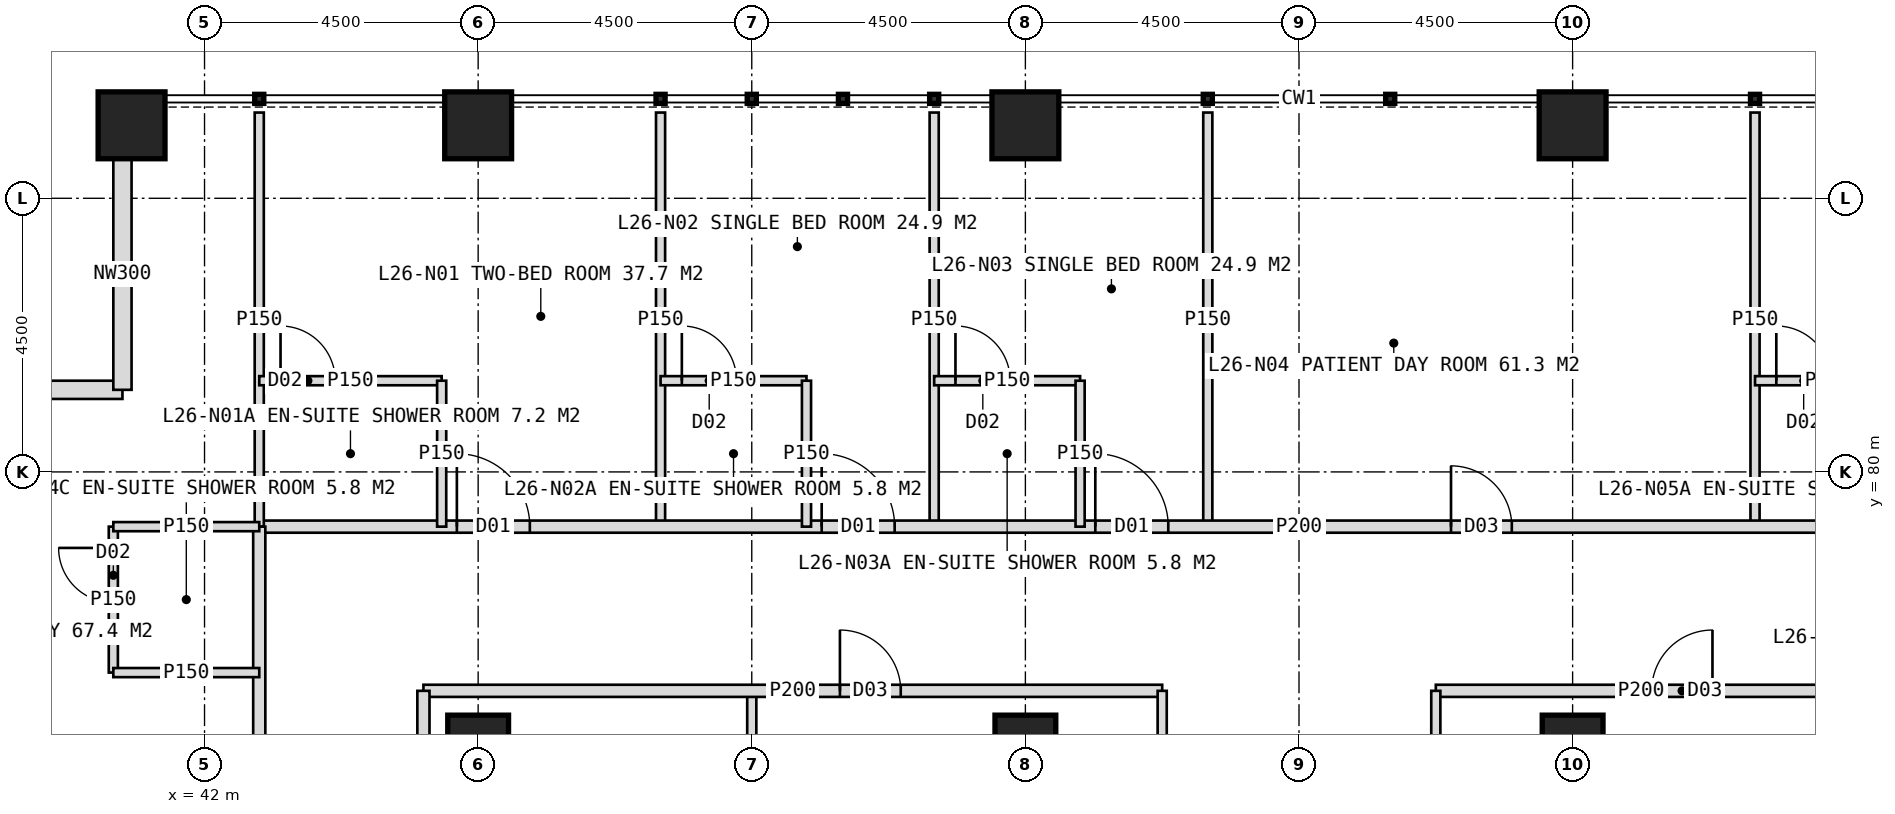
"""IFC4 building model, lengths in metres.
Left out: names, types, materials, properties, quantities, classifications, styles, units other than length and angle.
Written with IfcOpenShell. Run it as: python <this file> out.ifc"""

import sys

from ifc_helpers import new_model, si_unit, direction, frame, frame_2d, origin, origin_2d, place, context, subcontext, project, spatial, rectangle, hollow_rectangle, extrude, element, fill, save


model = new_model("IFC4")
c1 = context("Model", 3, precision=1e-05, world=origin(), true_north=direction((0.0, 1.0)))
c2 = subcontext(c1, "Body", "Model", "MODEL_VIEW")
j1 = project(units=[si_unit("LENGTHUNIT", "METRE"), si_unit("PLANEANGLEUNIT", "RADIAN")], contexts=[c1])
p1 = place(None, origin())
s1 = spatial("IfcSite", under=j1, at=p1, CompositionType="ELEMENT")
p2 = place(p1, origin())
s2 = spatial("IfcBuilding", under=s1, at=p2, CompositionType="ELEMENT")
p3 = place(p2, frame((0.0, 0.0, 112.0)))
s3 = spatial("IfcBuildingStorey", under=s2, at=p3, CompositionType="ELEMENT", Elevation=112.0)
for number, where, z_axis, x_axis in (
    (1, (46.5, 75.5, 0.0), (0.0, 0.0, 1.0), (1.0, 0.0, 0.0)),
    (2, (55.5, 75.5, 0.0), (0.0, 0.0, 1.0), (1.0, 0.0, 0.0)),
    (3, (64.5, 75.5, 0.0), (0.0, 0.0, 1.0), (1.0, 0.0, 0.0)),
):
    element("IfcColumn", number, at=place(p3, frame(where, z_axis=z_axis, x_axis=x_axis)), inside=s3, PredefinedType="COLUMN", context=c2, shape_type="SweptSolid", body=[
        extrude(hollow_rectangle(XDim=1.0, YDim=1.0, WallThickness=0.1, at=origin_2d()), origin(), (0.0, 0.0, 1.0), 4.0),
    ])
for number, where, z_axis, x_axis in (
    (4, (40.8, 85.7, 0.0), (0.0, 0.0, 1.0), (1.0, 0.0, 0.0)),
    (5, (46.5, 85.7, 0.0), (0.0, 0.0, 1.0), (1.0, 0.0, 0.0)),
    (6, (55.5, 85.7, 0.0), (0.0, 0.0, 1.0), (1.0, 0.0, 0.0)),
    (7, (64.5, 85.7, 0.0), (0.0, 0.0, 1.0), (1.0, 0.0, 0.0)),
):
    element("IfcColumn", number, at=place(p3, frame(where, z_axis=z_axis, x_axis=x_axis)), inside=s3, PredefinedType="COLUMN", context=c2, shape_type="SweptSolid", body=[
        extrude(hollow_rectangle(XDim=1.1, YDim=1.1, WallThickness=0.1, at=origin_2d()), origin(), (0.0, 0.0, 1.0), 4.0),
    ])
for number, where, z_axis, x_axis in (
    (8, (36.85, 81.35, 0.0), (0.0, 0.0, 1.0), (1.0, 0.0, 0.0)),
    (9, (40.65, 81.35, 0.0), (0.0, 0.0, 1.0), (0.0, 1.0, 0.0)),
):
    element("IfcWall", number, at=place(p3, frame(where, z_axis=z_axis, x_axis=x_axis)), inside=s3, PredefinedType="ELEMENTEDWALL", context=c2, shape_type="SweptSolid", body=[
        extrude(rectangle(XDim=3.8, YDim=0.3, at=frame_2d((1.9, 0.0))), origin(), (0.0, 0.0, 1.0), 4.0),
    ])
for number, where, z_axis, x_axis in (
    (10, (49.5, 79.1, 0.0), (0.0, 0.0, 1.0), (0.0, 1.0, 0.0)),
    (11, (54.0, 79.1, 0.0), (0.0, 0.0, 1.0), (0.0, 1.0, 0.0)),
    (12, (58.5, 79.1, 0.0), (0.0, 0.0, 1.0), (0.0, 1.0, 0.0)),
    (13, (67.5, 79.1, 0.0), (0.0, 0.0, 1.0), (0.0, 1.0, 0.0)),
):
    element("IfcWall", number, at=place(p3, frame(where, z_axis=z_axis, x_axis=x_axis)), inside=s3, PredefinedType="PARTITIONING", context=c2, shape_type="SweptSolid", body=[
        extrude(rectangle(XDim=6.81, YDim=0.15, at=frame_2d((3.405, 0.0))), origin(), (0.0, 0.0, 1.0), 3.75),
    ])
p4 = place(p3, frame((42.9, 79.1, 0.0), z_axis=(0.0, 0.0, 1.0), x_axis=(1.0, 0.0, 0.0)))
e14 = element("IfcWall", 14, at=p4, inside=s3, PredefinedType="PARTITIONING", context=c2, shape_type="SweptSolid", body=[
    extrude(rectangle(XDim=34.2, YDim=0.2, at=frame_2d((17.1, 0.0))), origin(), (0.0, 0.0, 1.0), 3.75),
])
p5 = place(p4, frame((3.25, 0.0, 0.0)))
e15 = element("IfcOpeningElement", 15, at=p5, cuts=e14, PredefinedType="OPENING", context=c2, shape_type="SweptSolid", body=[
    extrude(rectangle(XDim=1.2, YDim=2.2, at=frame_2d((0.6, 1.1))), frame((0.0, 0.11, 0.0), z_axis=(0.0, -1.0, 0.0), x_axis=(1.0, 0.0, 0.0)), (0.0, 0.0, 1.0), 0.22),
])
p6 = place(p4, frame((9.25, 0.0, 0.0)))
e16 = element("IfcOpeningElement", 16, at=p6, cuts=e14, PredefinedType="OPENING", context=c2, shape_type="SweptSolid", body=[
    extrude(rectangle(XDim=1.2, YDim=2.2, at=frame_2d((0.6, 1.1))), frame((0.0, 0.11, 0.0), z_axis=(0.0, -1.0, 0.0), x_axis=(1.0, 0.0, 0.0)), (0.0, 0.0, 1.0), 0.22),
])
p7 = place(p4, frame((13.75, 0.0, 0.0)))
e17 = element("IfcOpeningElement", 17, at=p7, cuts=e14, PredefinedType="OPENING", context=c2, shape_type="SweptSolid", body=[
    extrude(rectangle(XDim=1.2, YDim=2.2, at=frame_2d((0.6, 1.1))), frame((0.0, 0.11, 0.0), z_axis=(0.0, -1.0, 0.0), x_axis=(1.0, 0.0, 0.0)), (0.0, 0.0, 1.0), 0.22),
])
p8 = place(p4, frame((19.6, 0.0, 0.0)))
e18 = element("IfcOpeningElement", 18, at=p8, cuts=e14, PredefinedType="OPENING", context=c2, shape_type="SweptSolid", body=[
    extrude(rectangle(XDim=1.0, YDim=2.1, at=frame_2d((0.5, 1.05))), frame((0.0, 0.11, 0.0), z_axis=(0.0, -1.0, 0.0), x_axis=(1.0, 0.0, 0.0)), (0.0, 0.0, 1.0), 0.22),
])
p9 = place(p4, frame((27.25, 0.0, 0.0)))
e19 = element("IfcOpeningElement", 19, at=p9, cuts=e14, PredefinedType="OPENING", context=c2, shape_type="SweptSolid", body=[
    extrude(rectangle(XDim=1.2, YDim=2.2, at=frame_2d((0.6, 1.1))), frame((0.0, 0.11, 0.0), z_axis=(0.0, -1.0, 0.0), x_axis=(1.0, 0.0, 0.0)), (0.0, 0.0, 1.0), 0.22),
])
p10 = place(p3, frame((42.9, 79.1, 0.0), z_axis=(0.0, 0.0, 1.0), x_axis=(0.0, 1.0, 0.0)))
e20 = element("IfcWall", 20, at=p10, inside=s3, PredefinedType="PARTITIONING", context=c2, shape_type="SweptSolid", body=[
    extrude(rectangle(XDim=6.81, YDim=0.15, at=frame_2d((3.405, 0.0))), origin(), (0.0, 0.0, 1.0), 3.75),
])
p11 = place(p3, frame((42.9, 81.5, 0.0), z_axis=(0.0, 0.0, 1.0), x_axis=(1.0, 0.0, 0.0)))
e21 = element("IfcWall", 21, at=p11, inside=s3, PredefinedType="PARTITIONING", context=c2, shape_type="SweptSolid", body=[
    extrude(rectangle(XDim=3.0, YDim=0.15, at=frame_2d((1.5, 0.0))), origin(), (0.0, 0.0, 1.0), 3.75),
])
p12 = place(p11, frame((0.35, 0.0, 0.0)))
e22 = element("IfcOpeningElement", 22, at=p12, cuts=e21, PredefinedType="OPENING", context=c2, shape_type="SweptSolid", body=[
    extrude(rectangle(XDim=0.9, YDim=2.1, at=frame_2d((0.45, 1.05))), frame((0.0, 0.085, 0.0), z_axis=(0.0, -1.0, 0.0), x_axis=(1.0, 0.0, 0.0)), (0.0, 0.0, 1.0), 0.17),
])
p13 = place(p3, frame((45.9, 79.1, 0.0), z_axis=(0.0, 0.0, 1.0), x_axis=(0.0, 1.0, 0.0)))
e23 = element("IfcWall", 23, at=p13, inside=s3, PredefinedType="PARTITIONING", context=c2, shape_type="SweptSolid", body=[
    extrude(rectangle(XDim=2.4, YDim=0.15, at=frame_2d((1.2, 0.0))), origin(), (0.0, 0.0, 1.0), 3.75),
])
p14 = place(p3, frame((49.5, 81.5, 0.0), z_axis=(0.0, 0.0, 1.0), x_axis=(1.0, 0.0, 0.0)))
e24 = element("IfcWall", 24, at=p14, inside=s3, PredefinedType="PARTITIONING", context=c2, shape_type="SweptSolid", body=[
    extrude(rectangle(XDim=2.4, YDim=0.15, at=frame_2d((1.2, 0.0))), origin(), (0.0, 0.0, 1.0), 3.75),
])
p15 = place(p14, frame((0.35, 0.0, 0.0)))
e25 = element("IfcOpeningElement", 25, at=p15, cuts=e24, PredefinedType="OPENING", context=c2, shape_type="SweptSolid", body=[
    extrude(rectangle(XDim=0.9, YDim=2.1, at=frame_2d((0.45, 1.05))), frame((0.0, 0.085, 0.0), z_axis=(0.0, -1.0, 0.0), x_axis=(1.0, 0.0, 0.0)), (0.0, 0.0, 1.0), 0.17),
])
p16 = place(p3, frame((51.9, 79.1, 0.0), z_axis=(0.0, 0.0, 1.0), x_axis=(0.0, 1.0, 0.0)))
e26 = element("IfcWall", 26, at=p16, inside=s3, PredefinedType="PARTITIONING", context=c2, shape_type="SweptSolid", body=[
    extrude(rectangle(XDim=2.4, YDim=0.15, at=frame_2d((1.2, 0.0))), origin(), (0.0, 0.0, 1.0), 3.75),
])
p17 = place(p3, frame((54.0, 81.5, 0.0), z_axis=(0.0, 0.0, 1.0), x_axis=(1.0, 0.0, 0.0)))
e27 = element("IfcWall", 27, at=p17, inside=s3, PredefinedType="PARTITIONING", context=c2, shape_type="SweptSolid", body=[
    extrude(rectangle(XDim=2.4, YDim=0.15, at=frame_2d((1.2, 0.0))), origin(), (0.0, 0.0, 1.0), 3.75),
])
p18 = place(p17, frame((0.35, 0.0, 0.0)))
e28 = element("IfcOpeningElement", 28, at=p18, cuts=e27, PredefinedType="OPENING", context=c2, shape_type="SweptSolid", body=[
    extrude(rectangle(XDim=0.9, YDim=2.1, at=frame_2d((0.45, 1.05))), frame((0.0, 0.085, 0.0), z_axis=(0.0, -1.0, 0.0), x_axis=(1.0, 0.0, 0.0)), (0.0, 0.0, 1.0), 0.17),
])
p19 = place(p3, frame((56.4, 79.1, 0.0), z_axis=(0.0, 0.0, 1.0), x_axis=(0.0, 1.0, 0.0)))
e29 = element("IfcWall", 29, at=p19, inside=s3, PredefinedType="PARTITIONING", context=c2, shape_type="SweptSolid", body=[
    extrude(rectangle(XDim=2.4, YDim=0.15, at=frame_2d((1.2, 0.0))), origin(), (0.0, 0.0, 1.0), 3.75),
])
p20 = place(p3, frame((67.5, 81.5, 0.0), z_axis=(0.0, 0.0, 1.0), x_axis=(1.0, 0.0, 0.0)))
e30 = element("IfcWall", 30, at=p20, inside=s3, PredefinedType="PARTITIONING", context=c2, shape_type="SweptSolid", body=[
    extrude(rectangle(XDim=2.4, YDim=0.15, at=frame_2d((1.2, 0.0))), origin(), (0.0, 0.0, 1.0), 3.75),
])
p21 = place(p20, frame((0.35, 0.0, 0.0)))
e31 = element("IfcOpeningElement", 31, at=p21, cuts=e30, PredefinedType="OPENING", context=c2, shape_type="SweptSolid", body=[
    extrude(rectangle(XDim=0.9, YDim=2.1, at=frame_2d((0.45, 1.05))), frame((0.0, 0.085, 0.0), z_axis=(0.0, -1.0, 0.0), x_axis=(1.0, 0.0, 0.0)), (0.0, 0.0, 1.0), 0.17),
])
p22 = place(p3, frame((51.0, 71.0, 0.0), z_axis=(0.0, 0.0, 1.0), x_axis=(0.0, 1.0, 0.0)))
e32 = element("IfcWall", 32, at=p22, inside=s3, PredefinedType="PARTITIONING", context=c2, shape_type="SweptSolid", body=[
    extrude(rectangle(XDim=5.4, YDim=0.15, at=frame_2d((2.7, 0.0))), origin(), (0.0, 0.0, 1.0), 3.75),
])
p23 = place(p3, frame((45.6, 76.4, 0.0), z_axis=(0.0, 0.0, 1.0), x_axis=(1.0, 0.0, 0.0)))
e33 = element("IfcWall", 33, at=p23, inside=s3, PredefinedType="PARTITIONING", context=c2, shape_type="SweptSolid", body=[
    extrude(rectangle(XDim=12.15, YDim=0.2, at=frame_2d((6.075, 0.0))), origin(), (0.0, 0.0, 1.0), 3.75),
])
p24 = place(p23, frame((6.85, 0.0, 0.0)))
e34 = element("IfcOpeningElement", 34, at=p24, cuts=e33, PredefinedType="OPENING", context=c2, shape_type="SweptSolid", body=[
    extrude(rectangle(XDim=1.0, YDim=2.1, at=frame_2d((0.5, 1.05))), frame((0.0, 0.11, 0.0), z_axis=(0.0, -1.0, 0.0), x_axis=(1.0, 0.0, 0.0)), (0.0, 0.0, 1.0), 0.22),
])
p25 = place(p3, frame((62.25, 76.4, 0.0), z_axis=(0.0, 0.0, 1.0), x_axis=(1.0, 0.0, 0.0)))
e35 = element("IfcWall", 35, at=p25, inside=s3, PredefinedType="PARTITIONING", context=c2, shape_type="SweptSolid", body=[
    extrude(rectangle(XDim=6.75, YDim=0.2, at=frame_2d((3.375, 0.0))), origin(), (0.0, 0.0, 1.0), 3.75),
])
p26 = place(p25, frame((3.55, 0.0, 0.0)))
e36 = element("IfcOpeningElement", 36, at=p26, cuts=e35, PredefinedType="OPENING", context=c2, shape_type="SweptSolid", body=[
    extrude(rectangle(XDim=1.0, YDim=2.1, at=frame_2d((0.5, 1.05))), frame((0.0, 0.11, 0.0), z_axis=(0.0, -1.0, 0.0), x_axis=(1.0, 0.0, 0.0)), (0.0, 0.0, 1.0), 0.22),
])
p27 = place(p3, frame((57.75, 71.0, 0.0), z_axis=(0.0, 0.0, 1.0), x_axis=(0.0, 1.0, 0.0)))
e37 = element("IfcWall", 37, at=p27, inside=s3, PredefinedType="PARTITIONING", context=c2, shape_type="SweptSolid", body=[
    extrude(rectangle(XDim=5.4, YDim=0.15, at=frame_2d((2.7, 0.0))), origin(), (0.0, 0.0, 1.0), 3.75),
])
p28 = place(p27, frame((0.6, 0.0, 0.0)))
e38 = element("IfcOpeningElement", 38, at=p28, cuts=e37, PredefinedType="OPENING", context=c2, shape_type="SweptSolid", body=[
    extrude(rectangle(XDim=0.9, YDim=2.1, at=frame_2d((0.45, 1.05))), frame((0.0, 0.085, 0.0), z_axis=(0.0, -1.0, 0.0), x_axis=(1.0, 0.0, 0.0)), (0.0, 0.0, 1.0), 0.17),
])
p29 = place(p3, frame((62.25, 71.0, 0.0), z_axis=(0.0, 0.0, 1.0), x_axis=(0.0, 1.0, 0.0)))
e39 = element("IfcWall", 39, at=p29, inside=s3, PredefinedType="PARTITIONING", context=c2, shape_type="SweptSolid", body=[
    extrude(rectangle(XDim=5.4, YDim=0.15, at=frame_2d((2.7, 0.0))), origin(), (0.0, 0.0, 1.0), 3.75),
])
p30 = place(p29, frame((0.6, 0.0, 0.0)))
e40 = element("IfcOpeningElement", 40, at=p30, cuts=e39, PredefinedType="OPENING", context=c2, shape_type="SweptSolid", body=[
    extrude(rectangle(XDim=0.9, YDim=2.1, at=frame_2d((0.45, 1.05))), frame((0.0, 0.085, 0.0), z_axis=(0.0, -1.0, 0.0), x_axis=(1.0, 0.0, 0.0)), (0.0, 0.0, 1.0), 0.17),
])
p31 = place(p3, frame((42.9, 44.9, 0.0), z_axis=(0.0, 0.0, 1.0), x_axis=(0.0, 1.0, 0.0)))
e41 = element("IfcWall", 41, at=p31, inside=s3, PredefinedType="PARTITIONING", context=c2, shape_type="SweptSolid", body=[
    extrude(rectangle(XDim=34.2, YDim=0.2, at=frame_2d((17.1, 0.0))), origin(), (0.0, 0.0, 1.0), 3.75),
])
p32 = place(p31, frame((3.25, 0.0, 0.0)))
e42 = element("IfcOpeningElement", 42, at=p32, cuts=e41, PredefinedType="OPENING", context=c2, shape_type="SweptSolid", body=[
    extrude(rectangle(XDim=1.2, YDim=2.2, at=frame_2d((0.6, 1.1))), frame((0.0, 0.11, 0.0), z_axis=(0.0, -1.0, 0.0), x_axis=(1.0, 0.0, 0.0)), (0.0, 0.0, 1.0), 0.22),
])
p33 = place(p31, frame((10.75, 0.0, 0.0)))
e43 = element("IfcOpeningElement", 43, at=p33, cuts=e41, PredefinedType="OPENING", context=c2, shape_type="SweptSolid", body=[
    extrude(rectangle(XDim=1.2, YDim=2.2, at=frame_2d((0.6, 1.1))), frame((0.0, 0.11, 0.0), z_axis=(0.0, -1.0, 0.0), x_axis=(1.0, 0.0, 0.0)), (0.0, 0.0, 1.0), 0.22),
])
p34 = place(p31, frame((19.75, 0.0, 0.0)))
e44 = element("IfcOpeningElement", 44, at=p34, cuts=e41, PredefinedType="OPENING", context=c2, shape_type="SweptSolid", body=[
    extrude(rectangle(XDim=1.2, YDim=2.2, at=frame_2d((0.6, 1.1))), frame((0.0, 0.11, 0.0), z_axis=(0.0, -1.0, 0.0), x_axis=(1.0, 0.0, 0.0)), (0.0, 0.0, 1.0), 0.22),
])
p35 = place(p31, frame((28.75, 0.0, 0.0)))
e45 = element("IfcOpeningElement", 45, at=p35, cuts=e41, PredefinedType="OPENING", context=c2, shape_type="SweptSolid", body=[
    extrude(rectangle(XDim=1.2, YDim=2.2, at=frame_2d((0.6, 1.1))), frame((0.0, 0.11, 0.0), z_axis=(0.0, -1.0, 0.0), x_axis=(1.0, 0.0, 0.0)), (0.0, 0.0, 1.0), 0.22),
])
p36 = place(p3, frame((40.5, 76.7, 0.0), z_axis=(0.0, 0.0, 1.0), x_axis=(0.0, 1.0, 0.0)))
e46 = element("IfcWall", 46, at=p36, inside=s3, PredefinedType="PARTITIONING", context=c2, shape_type="SweptSolid", body=[
    extrude(rectangle(XDim=2.4, YDim=0.15, at=frame_2d((1.2, 0.0))), origin(), (0.0, 0.0, 1.0), 3.75),
])
p37 = place(p36, frame((1.15, 0.0, 0.0)))
e47 = element("IfcOpeningElement", 47, at=p37, cuts=e46, PredefinedType="OPENING", context=c2, shape_type="SweptSolid", body=[
    extrude(rectangle(XDim=0.9, YDim=2.1, at=frame_2d((0.45, 1.05))), frame((0.0, 0.085, 0.0), z_axis=(0.0, -1.0, 0.0), x_axis=(1.0, 0.0, 0.0)), (0.0, 0.0, 1.0), 0.17),
])
for number, where, z_axis, x_axis in (
    (48, (42.9, 76.7, 0.0), (0.0, 0.0, 1.0), (-1.0, 0.0, 0.0)),
    (49, (42.9, 79.1, 0.0), (0.0, 0.0, 1.0), (-1.0, 0.0, 0.0)),
):
    element("IfcWall", number, at=place(p3, frame(where, z_axis=z_axis, x_axis=x_axis)), inside=s3, PredefinedType="PARTITIONING", context=c2, shape_type="SweptSolid", body=[
        extrude(rectangle(XDim=2.4, YDim=0.15, at=frame_2d((1.2, 0.0))), origin(), (0.0, 0.0, 1.0), 3.75),
    ])
p38 = place(p3, frame((45.6, 62.0, 0.0), z_axis=(0.0, 0.0, 1.0), x_axis=(0.0, 1.0, 0.0)))
e50 = element("IfcWall", 50, at=p38, inside=s3, PredefinedType="PARTITIONING", context=c2, shape_type="SweptSolid", body=[
    extrude(rectangle(XDim=14.4, YDim=0.2, at=frame_2d((7.2, 0.0))), origin(), (0.0, 0.0, 1.0), 3.75),
])
p39 = place(p38, frame((1.45, 0.0, 0.0)))
e51 = element("IfcOpeningElement", 51, at=p39, cuts=e50, PredefinedType="OPENING", context=c2, shape_type="SweptSolid", body=[
    extrude(rectangle(XDim=1.0, YDim=2.1, at=frame_2d((0.5, 1.05))), frame((0.0, 0.11, 0.0), z_axis=(0.0, -1.0, 0.0), x_axis=(1.0, 0.0, 0.0)), (0.0, 0.0, 1.0), 0.22),
])
p40 = place(p38, frame((11.2, 0.0, 0.0)))
e52 = element("IfcOpeningElement", 52, at=p40, cuts=e50, PredefinedType="OPENING", context=c2, shape_type="SweptSolid", body=[
    extrude(rectangle(XDim=1.0, YDim=2.1, at=frame_2d((0.5, 1.05))), frame((0.0, 0.11, 0.0), z_axis=(0.0, -1.0, 0.0), x_axis=(1.0, 0.0, 0.0)), (0.0, 0.0, 1.0), 0.22),
])
p41 = place(p5, origin())
e53 = element("IfcDoor", 53, at=p41, inside=s3, OperationType="SINGLE_SWING_LEFT", PredefinedType="DOOR", context=c2, shape_type="SweptSolid", body=[
    extrude(rectangle(XDim=1.2, YDim=2.2, at=frame_2d((0.6, 1.1))), frame((0.0, 0.025, 0.0), z_axis=(0.0, -1.0, 0.0), x_axis=(1.0, 0.0, 0.0)), (0.0, 0.0, 1.0), 0.05),
])
fill(e15, e53)
p42 = place(p12, origin())
e54 = element("IfcDoor", 54, at=p42, inside=s3, OperationType="SINGLE_SWING_LEFT", PredefinedType="DOOR", context=c2, shape_type="SweptSolid", body=[
    extrude(rectangle(XDim=0.9, YDim=2.1, at=frame_2d((0.45, 1.05))), frame((0.0, 0.025, 0.0), z_axis=(0.0, -1.0, 0.0), x_axis=(1.0, 0.0, 0.0)), (0.0, 0.0, 1.0), 0.05),
])
fill(e22, e54)
p43 = place(p6, origin())
e55 = element("IfcDoor", 55, at=p43, inside=s3, OperationType="SINGLE_SWING_LEFT", PredefinedType="DOOR", context=c2, shape_type="SweptSolid", body=[
    extrude(rectangle(XDim=1.2, YDim=2.2, at=frame_2d((0.6, 1.1))), frame((0.0, 0.025, 0.0), z_axis=(0.0, -1.0, 0.0), x_axis=(1.0, 0.0, 0.0)), (0.0, 0.0, 1.0), 0.05),
])
fill(e16, e55)
p44 = place(p15, origin())
e56 = element("IfcDoor", 56, at=p44, inside=s3, OperationType="SINGLE_SWING_LEFT", PredefinedType="DOOR", context=c2, shape_type="SweptSolid", body=[
    extrude(rectangle(XDim=0.9, YDim=2.1, at=frame_2d((0.45, 1.05))), frame((0.0, 0.025, 0.0), z_axis=(0.0, -1.0, 0.0), x_axis=(1.0, 0.0, 0.0)), (0.0, 0.0, 1.0), 0.05),
])
fill(e25, e56)
p45 = place(p7, origin())
e57 = element("IfcDoor", 57, at=p45, inside=s3, OperationType="SINGLE_SWING_LEFT", PredefinedType="DOOR", context=c2, shape_type="SweptSolid", body=[
    extrude(rectangle(XDim=1.2, YDim=2.2, at=frame_2d((0.6, 1.1))), frame((0.0, 0.025, 0.0), z_axis=(0.0, -1.0, 0.0), x_axis=(1.0, 0.0, 0.0)), (0.0, 0.0, 1.0), 0.05),
])
fill(e17, e57)
p46 = place(p18, origin())
e58 = element("IfcDoor", 58, at=p46, inside=s3, OperationType="SINGLE_SWING_LEFT", PredefinedType="DOOR", context=c2, shape_type="SweptSolid", body=[
    extrude(rectangle(XDim=0.9, YDim=2.1, at=frame_2d((0.45, 1.05))), frame((0.0, 0.025, 0.0), z_axis=(0.0, -1.0, 0.0), x_axis=(1.0, 0.0, 0.0)), (0.0, 0.0, 1.0), 0.05),
])
fill(e28, e58)
p47 = place(p8, origin())
e59 = element("IfcDoor", 59, at=p47, inside=s3, OperationType="SINGLE_SWING_LEFT", PredefinedType="DOOR", context=c2, shape_type="SweptSolid", body=[
    extrude(rectangle(XDim=1.0, YDim=2.1, at=frame_2d((0.5, 1.05))), frame((0.0, 0.025, 0.0), z_axis=(0.0, -1.0, 0.0), x_axis=(1.0, 0.0, 0.0)), (0.0, 0.0, 1.0), 0.05),
])
fill(e18, e59)
p48 = place(p21, origin())
e60 = element("IfcDoor", 60, at=p48, inside=s3, OperationType="SINGLE_SWING_LEFT", PredefinedType="DOOR", context=c2, shape_type="SweptSolid", body=[
    extrude(rectangle(XDim=0.9, YDim=2.1, at=frame_2d((0.45, 1.05))), frame((0.0, 0.025, 0.0), z_axis=(0.0, -1.0, 0.0), x_axis=(1.0, 0.0, 0.0)), (0.0, 0.0, 1.0), 0.05),
])
fill(e31, e60)
p49 = place(p24, origin())
e61 = element("IfcDoor", 61, at=p49, inside=s3, OperationType="SINGLE_SWING_LEFT", PredefinedType="DOOR", context=c2, shape_type="SweptSolid", body=[
    extrude(rectangle(XDim=1.0, YDim=2.1, at=frame_2d((0.5, 1.05))), frame((0.0, 0.025, 0.0), z_axis=(0.0, -1.0, 0.0), x_axis=(1.0, 0.0, 0.0)), (0.0, 0.0, 1.0), 0.05),
])
fill(e34, e61)
p50 = place(p26, origin())
e62 = element("IfcDoor", 62, at=p50, inside=s3, OperationType="SINGLE_SWING_RIGHT", PredefinedType="DOOR", context=c2, shape_type="SweptSolid", body=[
    extrude(rectangle(XDim=1.0, YDim=2.1, at=frame_2d((0.5, 1.05))), frame((0.0, 0.025, 0.0), z_axis=(0.0, -1.0, 0.0), x_axis=(1.0, 0.0, 0.0)), (0.0, 0.0, 1.0), 0.05),
])
fill(e36, e62)
p51 = place(p37, origin())
e63 = element("IfcDoor", 63, at=p51, inside=s3, OperationType="SINGLE_SWING_RIGHT", PredefinedType="DOOR", context=c2, shape_type="SweptSolid", body=[
    extrude(rectangle(XDim=0.9, YDim=2.1, at=frame_2d((0.45, 1.05))), frame((0.0, 0.025, 0.0), z_axis=(0.0, -1.0, 0.0), x_axis=(1.0, 0.0, 0.0)), (0.0, 0.0, 1.0), 0.05),
])
fill(e47, e63)
save(model, sys.argv[1])
